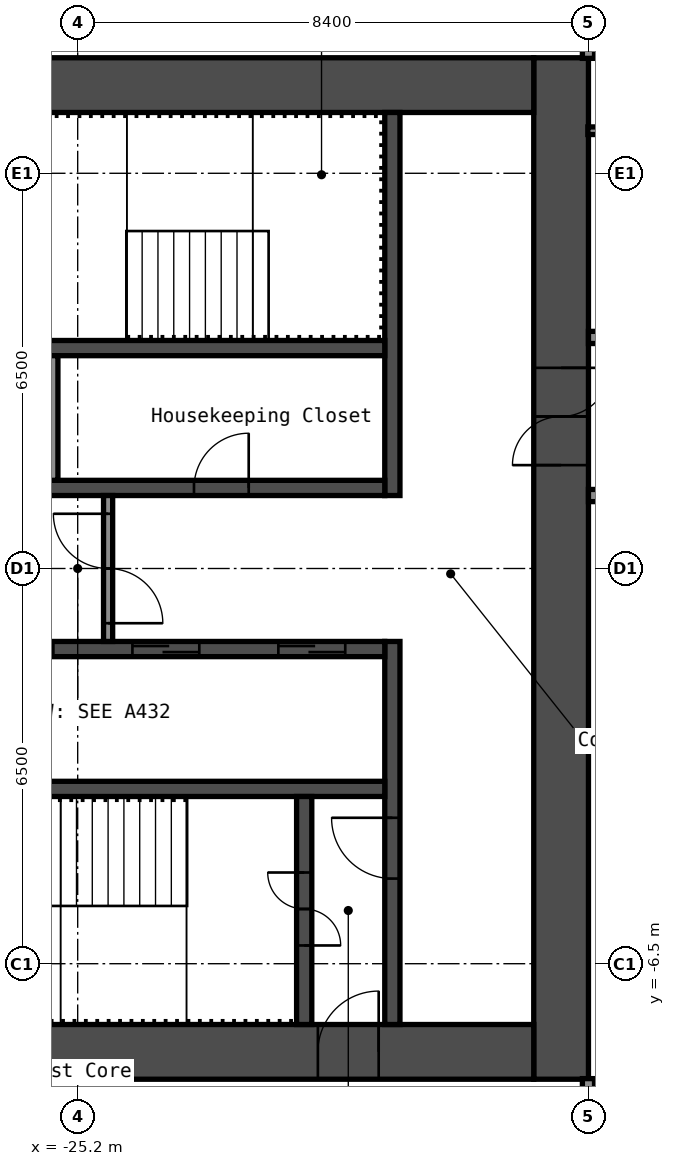
"""IFC4 building model, lengths in metres.
Left out: names, types, materials, properties, quantities, classifications, styles, units other than length and angle.
Written with IfcOpenShell. Run it as: python <this file> out.ifc"""

import sys

from ifc_helpers import new_model, si_unit, direction, frame, frame_2d, origin, place, context, subcontext, project, spatial, rectangle, extrude, element, fill, save


model = new_model("IFC4")
c1 = context("Model", 3, precision=1e-05, world=origin(), true_north=direction((0.0, 1.0)))
c2 = subcontext(c1, "Body", "Model", "MODEL_VIEW")
j1 = project(units=[si_unit("LENGTHUNIT", "METRE"), si_unit("PLANEANGLEUNIT", "RADIAN")], contexts=[c1])
p1 = place(None, origin())
s1 = spatial("IfcSite", under=j1, at=p1, CompositionType="ELEMENT")
p2 = place(p1, origin())
s2 = spatial("IfcBuilding", under=s1, at=p2, CompositionType="ELEMENT")
p3 = place(p2, frame((0.0, 0.0, 225.0)))
s3 = spatial("IfcBuildingStorey", under=s2, at=p3, CompositionType="ELEMENT", Elevation=225.0)
p4 = place(p3, frame((-17.25, -8.4, 0.0), z_axis=(0.0, 0.0, 1.0), x_axis=(0.0, 1.0, 0.0)))
e1 = element("IfcWall", 1, at=p4, inside=s3, PredefinedType="SHEAR", context=c2, shape_type="SweptSolid", body=[
    extrude(rectangle(XDim=16.8, YDim=0.9, at=frame_2d((8.4, 0.0))), origin(), (0.0, 0.0, 1.0), 2.9),
])
p5 = place(p4, frame((10.1, 0.0, 0.0)))
e2 = element("IfcOpeningElement", 2, at=p5, cuts=e1, PredefinedType="OPENING", context=c2, shape_type="SweptSolid", body=[
    extrude(rectangle(XDim=1.6, YDim=2.1, at=frame_2d((0.8, 1.05))), frame((0.0, 0.46, 0.0), z_axis=(0.0, -1.0, 0.0), x_axis=(1.0, 0.0, 0.0)), (0.0, 0.0, 1.0), 0.92),
])
p6 = place(p3, frame((-32.7, 7.95, 0.0), z_axis=(0.0, 0.0, 1.0), x_axis=(1.0, 0.0, 0.0)))
e3 = element("IfcWall", 3, at=p6, inside=s3, PredefinedType="SHEAR", context=c2, shape_type="SweptSolid", body=[
    extrude(rectangle(XDim=15.0, YDim=0.9, at=frame_2d((7.5, 0.0))), origin(), (0.0, 0.0, 1.0), 2.9),
])
p7 = place(p6, frame((3.4, 0.0, 0.0)))
e4 = element("IfcOpeningElement", 4, at=p7, cuts=e3, PredefinedType="OPENING", context=c2, shape_type="SweptSolid", body=[
    extrude(rectangle(XDim=1.2, YDim=2.1, at=frame_2d((0.6, 1.05))), frame((0.0, 0.46, 0.0), z_axis=(0.0, -1.0, 0.0), x_axis=(1.0, 0.0, 0.0)), (0.0, 0.0, 1.0), 0.92),
])
p8 = place(p6, frame((0.75, 0.0, 0.0)))
e5 = element("IfcOpeningElement", 5, at=p8, cuts=e3, PredefinedType="OPENING", context=c2, shape_type="SweptSolid", body=[
    extrude(rectangle(XDim=0.9, YDim=2.1, at=frame_2d((0.45, 1.05))), frame((0.0, 0.46, 0.0), z_axis=(0.0, -1.0, 0.0), x_axis=(1.0, 0.0, 0.0)), (0.0, 0.0, 1.0), 0.92),
])
p9 = place(p3, frame((-32.7, -7.95, 0.0), z_axis=(0.0, 0.0, 1.0), x_axis=(1.0, 0.0, 0.0)))
e6 = element("IfcWall", 6, at=p9, inside=s3, PredefinedType="SHEAR", context=c2, shape_type="SweptSolid", body=[
    extrude(rectangle(XDim=15.0, YDim=0.9, at=frame_2d((7.5, 0.0))), origin(), (0.0, 0.0, 1.0), 2.9),
])
p10 = place(p9, frame((11.45, 0.0, 0.0)))
e7 = element("IfcOpeningElement", 7, at=p10, cuts=e6, PredefinedType="OPENING", context=c2, shape_type="SweptSolid", body=[
    extrude(rectangle(XDim=1.0, YDim=2.1, at=frame_2d((0.5, 1.05))), frame((0.0, 0.46, 0.0), z_axis=(0.0, -1.0, 0.0), x_axis=(1.0, 0.0, 0.0)), (0.0, 0.0, 1.0), 0.92),
])
p11 = place(p3, frame((-20.025, 1.2, 0.0), z_axis=(0.0, 0.0, 1.0), x_axis=(0.0, 1.0, 0.0)))
e8 = element("IfcWall", 8, at=p11, inside=s3, PredefinedType="SHEAR", context=c2, shape_type="SweptSolid", body=[
    extrude(rectangle(XDim=6.3, YDim=0.25, at=frame_2d((3.15, 0.0))), origin(), (0.0, 0.0, 1.0), 2.9),
])
p12 = place(p3, frame((-20.025, -7.5, 0.0), z_axis=(0.0, 0.0, 1.0), x_axis=(0.0, 1.0, 0.0)))
e9 = element("IfcWall", 9, at=p12, inside=s3, PredefinedType="SHEAR", context=c2, shape_type="SweptSolid", body=[
    extrude(rectangle(XDim=6.3, YDim=0.25, at=frame_2d((3.15, 0.0))), origin(), (0.0, 0.0, 1.0), 2.9),
])
p13 = place(p12, frame((2.4, 0.0, 0.0)))
e10 = element("IfcOpeningElement", 10, at=p13, cuts=e9, PredefinedType="OPENING", context=c2, shape_type="SweptSolid", body=[
    extrude(rectangle(XDim=1.0, YDim=2.1, at=frame_2d((0.5, 1.05))), frame((0.0, 0.135, 0.0), z_axis=(0.0, -1.0, 0.0), x_axis=(1.0, 0.0, 0.0)), (0.0, 0.0, 1.0), 0.27),
])
p14 = place(p3, frame((-27.65, 1.325, 0.0), z_axis=(0.0, 0.0, 1.0), x_axis=(1.0, 0.0, 0.0)))
e11 = element("IfcWall", 11, at=p14, inside=s3, PredefinedType="SHEAR", context=c2, shape_type="SweptSolid", body=[
    extrude(rectangle(XDim=7.5, YDim=0.25, at=frame_2d((3.75, 0.0))), origin(), (0.0, 0.0, 1.0), 2.9),
])
p15 = place(p14, frame((4.363, 0.0, 0.0)))
e12 = element("IfcOpeningElement", 12, at=p15, cuts=e11, PredefinedType="OPENING", context=c2, shape_type="SweptSolid", body=[
    extrude(rectangle(XDim=0.9, YDim=2.1, at=frame_2d((0.45, 1.05))), frame((0.0, 0.135, 0.0), z_axis=(0.0, -1.0, 0.0), x_axis=(1.0, 0.0, 0.0)), (0.0, 0.0, 1.0), 0.27),
])
p16 = place(p14, frame((0.663, 0.0, 0.0)))
e13 = element("IfcOpeningElement", 13, at=p16, cuts=e11, PredefinedType="OPENING", context=c2, shape_type="SweptSolid", body=[
    extrude(rectangle(XDim=0.9, YDim=2.1, at=frame_2d((0.45, 1.05))), frame((0.0, 0.135, 0.0), z_axis=(0.0, -1.0, 0.0), x_axis=(1.0, 0.0, 0.0)), (0.0, 0.0, 1.0), 0.27),
])
p17 = place(p3, frame((-27.65, 3.625, 0.0), z_axis=(0.0, 0.0, 1.0), x_axis=(1.0, 0.0, 0.0)))
e14 = element("IfcWall", 14, at=p17, inside=s3, PredefinedType="SHEAR", context=c2, shape_type="SweptSolid", body=[
    extrude(rectangle(XDim=7.5, YDim=0.25, at=frame_2d((3.75, 0.0))), origin(), (0.0, 0.0, 1.0), 2.9),
])
p18 = place(p3, frame((-27.65, -1.325, 0.0), z_axis=(0.0, 0.0, 1.0), x_axis=(1.0, 0.0, 0.0)))
e15 = element("IfcWall", 15, at=p18, inside=s3, PredefinedType="SHEAR", context=c2, shape_type="SweptSolid", body=[
    extrude(rectangle(XDim=7.5, YDim=0.25, at=frame_2d((3.75, 0.0))), origin(), (0.0, 0.0, 1.0), 2.9),
])
p19 = place(p18, frame((5.75, 0.0, 0.0)))
e16 = element("IfcOpeningElement", 16, at=p19, cuts=e15, PredefinedType="OPENING", context=c2, shape_type="SweptSolid", body=[
    extrude(rectangle(XDim=1.1, YDim=2.1, at=frame_2d((0.55, 1.05))), frame((0.0, 0.135, 0.0), z_axis=(0.0, -1.0, 0.0), x_axis=(1.0, 0.0, 0.0)), (0.0, 0.0, 1.0), 0.27),
])
p20 = place(p18, frame((3.35, 0.0, 0.0)))
e17 = element("IfcOpeningElement", 17, at=p20, cuts=e15, PredefinedType="OPENING", context=c2, shape_type="SweptSolid", body=[
    extrude(rectangle(XDim=1.1, YDim=2.1, at=frame_2d((0.55, 1.05))), frame((0.0, 0.135, 0.0), z_axis=(0.0, -1.0, 0.0), x_axis=(1.0, 0.0, 0.0)), (0.0, 0.0, 1.0), 0.27),
])
p21 = place(p18, frame((0.95, 0.0, 0.0)))
e18 = element("IfcOpeningElement", 18, at=p21, cuts=e15, PredefinedType="OPENING", context=c2, shape_type="SweptSolid", body=[
    extrude(rectangle(XDim=1.1, YDim=2.1, at=frame_2d((0.55, 1.05))), frame((0.0, 0.135, 0.0), z_axis=(0.0, -1.0, 0.0), x_axis=(1.0, 0.0, 0.0)), (0.0, 0.0, 1.0), 0.27),
])
p22 = place(p3, frame((-27.65, -3.625, 0.0), z_axis=(0.0, 0.0, 1.0), x_axis=(1.0, 0.0, 0.0)))
e19 = element("IfcWall", 19, at=p22, inside=s3, PredefinedType="SHEAR", context=c2, shape_type="SweptSolid", body=[
    extrude(rectangle(XDim=7.5, YDim=0.25, at=frame_2d((3.75, 0.0))), origin(), (0.0, 0.0, 1.0), 2.9),
])
p23 = place(p3, frame((-21.475, -7.5, 0.0), z_axis=(0.0, 0.0, 1.0), x_axis=(0.0, 1.0, 0.0)))
e20 = element("IfcWall", 20, at=p23, inside=s3, PredefinedType="SHEAR", context=c2, shape_type="SweptSolid", body=[
    extrude(rectangle(XDim=3.75, YDim=0.25, at=frame_2d((1.875, 0.0))), origin(), (0.0, 0.0, 1.0), 2.9),
])
p24 = place(p23, frame((1.3, 0.0, 0.0)))
e21 = element("IfcOpeningElement", 21, at=p24, cuts=e20, PredefinedType="OPENING", context=c2, shape_type="SweptSolid", body=[
    extrude(rectangle(XDim=1.2, YDim=2.1, at=frame_2d((0.6, 1.05))), frame((0.0, 0.135, 0.0), z_axis=(0.0, -1.0, 0.0), x_axis=(1.0, 0.0, 0.0)), (0.0, 0.0, 1.0), 0.27),
])
p25 = place(p3, frame((-24.7, -1.2, 0.0), z_axis=(0.0, 0.0, 1.0), x_axis=(0.0, 1.0, 0.0)))
e22 = element("IfcWall", 22, at=p25, inside=s3, PredefinedType="PARTITIONING", context=c2, shape_type="SweptSolid", body=[
    extrude(rectangle(XDim=2.4, YDim=0.15, at=frame_2d((1.2, 0.0))), origin(), (0.0, 0.0, 1.0), 2.9),
])
p26 = place(p25, frame((0.3, 0.0, 0.0)))
e23 = element("IfcOpeningElement", 23, at=p26, cuts=e22, PredefinedType="OPENING", context=c2, shape_type="SweptSolid", body=[
    extrude(rectangle(XDim=1.8, YDim=2.1, at=frame_2d((0.9, 1.05))), frame((0.0, 0.085, 0.0), z_axis=(0.0, -1.0, 0.0), x_axis=(1.0, 0.0, 0.0)), (0.0, 0.0, 1.0), 0.17),
])
p27 = place(p3, frame((-25.6, 1.45, 0.0), z_axis=(0.0, 0.0, 1.0), x_axis=(0.0, 1.0, 0.0)))
e24 = element("IfcWall", 24, at=p27, inside=s3, PredefinedType="PARTITIONING", context=c2, shape_type="SweptSolid", body=[
    extrude(rectangle(XDim=2.05, YDim=0.15, at=frame_2d((1.025, 0.0))), origin(), (0.0, 0.0, 1.0), 2.9),
])
p28 = place(p3, frame((-16.8, 1.2, 0.0), z_axis=(0.0, 0.0, 1.0), x_axis=(1.0, 0.0, 0.0)))
e25 = element("IfcWall", 25, at=p28, inside=s3, PredefinedType="PARTITIONING", context=c2, shape_type="SweptSolid", body=[
    extrude(rectangle(XDim=33.6, YDim=0.2, at=frame_2d((16.8, 0.0))), origin(), (0.0, 0.0, 1.0), 2.9),
])
p29 = place(p28, frame((2.0, 0.0, 0.0)))
e26 = element("IfcOpeningElement", 26, at=p29, cuts=e25, PredefinedType="OPENING", context=c2, shape_type="SweptSolid", body=[
    extrude(rectangle(XDim=1.0, YDim=2.1, at=frame_2d((0.5, 1.05))), frame((0.0, 0.11, 0.0), z_axis=(0.0, -1.0, 0.0), x_axis=(1.0, 0.0, 0.0)), (0.0, 0.0, 1.0), 0.22),
])
p30 = place(p28, frame((11.25, 0.0, 0.0)))
e27 = element("IfcOpeningElement", 27, at=p30, cuts=e25, PredefinedType="OPENING", context=c2, shape_type="SweptSolid", body=[
    extrude(rectangle(XDim=1.0, YDim=2.1, at=frame_2d((0.5, 1.05))), frame((0.0, 0.11, 0.0), z_axis=(0.0, -1.0, 0.0), x_axis=(1.0, 0.0, 0.0)), (0.0, 0.0, 1.0), 0.22),
])
p31 = place(p28, frame((12.95, 0.0, 0.0)))
e28 = element("IfcOpeningElement", 28, at=p31, cuts=e25, PredefinedType="OPENING", context=c2, shape_type="SweptSolid", body=[
    extrude(rectangle(XDim=1.0, YDim=2.1, at=frame_2d((0.5, 1.05))), frame((0.0, 0.11, 0.0), z_axis=(0.0, -1.0, 0.0), x_axis=(1.0, 0.0, 0.0)), (0.0, 0.0, 1.0), 0.22),
])
p32 = place(p28, frame((18.785, 0.0, 0.0)))
e29 = element("IfcOpeningElement", 29, at=p32, cuts=e25, PredefinedType="OPENING", context=c2, shape_type="SweptSolid", body=[
    extrude(rectangle(XDim=0.9, YDim=2.1, at=frame_2d((0.45, 1.05))), frame((0.0, 0.11, 0.0), z_axis=(0.0, -1.0, 0.0), x_axis=(1.0, 0.0, 0.0)), (0.0, 0.0, 1.0), 0.22),
])
p33 = place(p28, frame((22.985, 0.0, 0.0)))
e30 = element("IfcOpeningElement", 30, at=p33, cuts=e25, PredefinedType="OPENING", context=c2, shape_type="SweptSolid", body=[
    extrude(rectangle(XDim=0.9, YDim=2.1, at=frame_2d((0.45, 1.05))), frame((0.0, 0.11, 0.0), z_axis=(0.0, -1.0, 0.0), x_axis=(1.0, 0.0, 0.0)), (0.0, 0.0, 1.0), 0.22),
])
p34 = place(p28, frame((28.05, 0.0, 0.0)))
e31 = element("IfcOpeningElement", 31, at=p34, cuts=e25, PredefinedType="OPENING", context=c2, shape_type="SweptSolid", body=[
    extrude(rectangle(XDim=1.0, YDim=2.1, at=frame_2d((0.5, 1.05))), frame((0.0, 0.11, 0.0), z_axis=(0.0, -1.0, 0.0), x_axis=(1.0, 0.0, 0.0)), (0.0, 0.0, 1.0), 0.22),
])
p35 = place(p28, frame((29.75, 0.0, 0.0)))
e32 = element("IfcOpeningElement", 32, at=p35, cuts=e25, PredefinedType="OPENING", context=c2, shape_type="SweptSolid", body=[
    extrude(rectangle(XDim=1.0, YDim=2.1, at=frame_2d((0.5, 1.05))), frame((0.0, 0.11, 0.0), z_axis=(0.0, -1.0, 0.0), x_axis=(1.0, 0.0, 0.0)), (0.0, 0.0, 1.0), 0.22),
])
p36 = place(p3, frame((-16.8, 3.8, 0.0), z_axis=(0.0, 0.0, 1.0), x_axis=(1.0, 0.0, 0.0)))
e33 = element("IfcWall", 33, at=p36, inside=s3, PredefinedType="PARTITIONING", context=c2, shape_type="SweptSolid", body=[
    extrude(rectangle(XDim=33.6, YDim=0.2, at=frame_2d((16.8, 0.0))), origin(), (0.0, 0.0, 1.0), 2.9),
])
p37 = place(p36, frame((5.4, 0.0, 0.0)))
e34 = element("IfcOpeningElement", 34, at=p37, cuts=e33, PredefinedType="OPENING", context=c2, shape_type="SweptSolid", body=[
    extrude(rectangle(XDim=1.0, YDim=2.1, at=frame_2d((0.5, 1.05))), frame((0.0, 0.11, 0.0), z_axis=(0.0, -1.0, 0.0), x_axis=(1.0, 0.0, 0.0)), (0.0, 0.0, 1.0), 0.22),
])
p38 = place(p36, frame((11.25, 0.0, 0.0)))
e35 = element("IfcOpeningElement", 35, at=p38, cuts=e33, PredefinedType="OPENING", context=c2, shape_type="SweptSolid", body=[
    extrude(rectangle(XDim=1.0, YDim=2.1, at=frame_2d((0.5, 1.05))), frame((0.0, 0.11, 0.0), z_axis=(0.0, -1.0, 0.0), x_axis=(1.0, 0.0, 0.0)), (0.0, 0.0, 1.0), 0.22),
])
p39 = place(p36, frame((12.95, 0.0, 0.0)))
e36 = element("IfcOpeningElement", 36, at=p39, cuts=e33, PredefinedType="OPENING", context=c2, shape_type="SweptSolid", body=[
    extrude(rectangle(XDim=1.0, YDim=2.1, at=frame_2d((0.5, 1.05))), frame((0.0, 0.11, 0.0), z_axis=(0.0, -1.0, 0.0), x_axis=(1.0, 0.0, 0.0)), (0.0, 0.0, 1.0), 0.22),
])
p40 = place(p36, frame((18.2, 0.0, 0.0)))
e37 = element("IfcOpeningElement", 37, at=p40, cuts=e33, PredefinedType="OPENING", context=c2, shape_type="SweptSolid", body=[
    extrude(rectangle(XDim=0.9, YDim=2.1, at=frame_2d((0.45, 1.05))), frame((0.0, 0.11, 0.0), z_axis=(0.0, -1.0, 0.0), x_axis=(1.0, 0.0, 0.0)), (0.0, 0.0, 1.0), 0.22),
])
p41 = place(p36, frame((22.4, 0.0, 0.0)))
e38 = element("IfcOpeningElement", 38, at=p41, cuts=e33, PredefinedType="OPENING", context=c2, shape_type="SweptSolid", body=[
    extrude(rectangle(XDim=0.9, YDim=2.1, at=frame_2d((0.45, 1.05))), frame((0.0, 0.11, 0.0), z_axis=(0.0, -1.0, 0.0), x_axis=(1.0, 0.0, 0.0)), (0.0, 0.0, 1.0), 0.22),
])
p42 = place(p36, frame((28.05, 0.0, 0.0)))
e39 = element("IfcOpeningElement", 39, at=p42, cuts=e33, PredefinedType="OPENING", context=c2, shape_type="SweptSolid", body=[
    extrude(rectangle(XDim=1.0, YDim=2.1, at=frame_2d((0.5, 1.05))), frame((0.0, 0.11, 0.0), z_axis=(0.0, -1.0, 0.0), x_axis=(1.0, 0.0, 0.0)), (0.0, 0.0, 1.0), 0.22),
])
p43 = place(p36, frame((29.75, 0.0, 0.0)))
e40 = element("IfcOpeningElement", 40, at=p43, cuts=e33, PredefinedType="OPENING", context=c2, shape_type="SweptSolid", body=[
    extrude(rectangle(XDim=1.0, YDim=2.1, at=frame_2d((0.5, 1.05))), frame((0.0, 0.11, 0.0), z_axis=(0.0, -1.0, 0.0), x_axis=(1.0, 0.0, 0.0)), (0.0, 0.0, 1.0), 0.22),
])
p44 = place(p3, frame((-16.81, 7.2, 0.0), z_axis=(0.0, 0.0, 1.0), x_axis=(1.0, 0.0, 0.0)))
e41 = element("IfcWall", 41, at=p44, inside=s3, PredefinedType="PARTITIONING", context=c2, shape_type="SweptSolid", body=[
    extrude(rectangle(XDim=3.348, YDim=0.125, at=frame_2d((1.674, 0.0))), origin(), (0.0, 0.0, 1.0), 2.9),
])
p45 = place(p44, frame((1.31, 0.0, 0.0)))
e42 = element("IfcOpeningElement", 42, at=p45, cuts=e41, PredefinedType="OPENING", context=c2, shape_type="SweptSolid", body=[
    extrude(rectangle(XDim=0.8, YDim=2.1, at=frame_2d((0.4, 1.05))), frame((0.0, 0.073, 0.0), z_axis=(0.0, -1.0, 0.0), x_axis=(1.0, 0.0, 0.0)), (0.0, 0.0, 1.0), 0.145),
])
p46 = place(p3, frame((-16.8, -15.55, 0.0), z_axis=(0.0, 0.0, 1.0), x_axis=(0.0, 1.0, 0.0)))
e43 = element("IfcWall", 43, at=p46, inside=s3, PredefinedType="PARTITIONING", context=c2, shape_type="SweptSolid", body=[
    extrude(rectangle(XDim=7.16, YDim=0.2, at=frame_2d((3.58, 0.0))), origin(), (0.0, 0.0, 1.0), 2.9),
])
p47 = place(p3, frame((-16.8, 8.39, 0.0), z_axis=(0.0, 0.0, 1.0), x_axis=(0.0, 1.0, 0.0)))
e44 = element("IfcWall", 44, at=p47, inside=s3, PredefinedType="PARTITIONING", context=c2, shape_type="SweptSolid", body=[
    extrude(rectangle(XDim=12.16, YDim=0.2, at=frame_2d((6.08, 0.0))), origin(), (0.0, 0.0, 1.0), 2.9),
])
p48 = place(p5, origin())
e45 = element("IfcDoor", 45, at=p48, inside=s3, OperationType="DOUBLE_DOOR_SINGLE_SWING", PredefinedType="DOOR", context=c2, shape_type="SweptSolid", body=[
    extrude(rectangle(XDim=1.6, YDim=2.1, at=frame_2d((0.8, 1.05))), frame((0.0, 0.025, 0.0), z_axis=(0.0, -1.0, 0.0), x_axis=(1.0, 0.0, 0.0)), (0.0, 0.0, 1.0), 0.05),
])
fill(e2, e45)
p49 = place(p10, origin())
e46 = element("IfcDoor", 46, at=p49, inside=s3, OperationType="SINGLE_SWING_LEFT", PredefinedType="DOOR", context=c2, shape_type="SweptSolid", body=[
    extrude(rectangle(XDim=1.0, YDim=2.1, at=frame_2d((0.5, 1.05))), frame((0.0, 0.025, 0.0), z_axis=(0.0, -1.0, 0.0), x_axis=(1.0, 0.0, 0.0)), (0.0, 0.0, 1.0), 0.05),
])
fill(e7, e46)
p50 = place(p24, origin())
e47 = element("IfcDoor", 47, at=p50, inside=s3, OperationType="DOUBLE_DOOR_SINGLE_SWING", PredefinedType="DOOR", context=c2, shape_type="SweptSolid", body=[
    extrude(rectangle(XDim=1.2, YDim=2.1, at=frame_2d((0.6, 1.05))), frame((0.0, 0.025, 0.0), z_axis=(0.0, -1.0, 0.0), x_axis=(1.0, 0.0, 0.0)), (0.0, 0.0, 1.0), 0.05),
])
fill(e21, e47)
p51 = place(p13, origin())
e48 = element("IfcDoor", 48, at=p51, inside=s3, OperationType="SINGLE_SWING_LEFT", PredefinedType="DOOR", context=c2, shape_type="SweptSolid", body=[
    extrude(rectangle(XDim=1.0, YDim=2.1, at=frame_2d((0.5, 1.05))), frame((0.0, 0.025, 0.0), z_axis=(0.0, -1.0, 0.0), x_axis=(1.0, 0.0, 0.0)), (0.0, 0.0, 1.0), 0.05),
])
fill(e10, e48)
p52 = place(p26, origin())
e49 = element("IfcDoor", 49, at=p52, inside=s3, OperationType="DOUBLE_DOOR_SINGLE_SWING", PredefinedType="DOOR", context=c2, shape_type="SweptSolid", body=[
    extrude(rectangle(XDim=1.8, YDim=2.1, at=frame_2d((0.9, 1.05))), frame((0.0, 0.025, 0.0), z_axis=(0.0, -1.0, 0.0), x_axis=(1.0, 0.0, 0.0)), (0.0, 0.0, 1.0), 0.05),
])
fill(e23, e49)
p53 = place(p15, origin())
e50 = element("IfcDoor", 50, at=p53, inside=s3, OperationType="SINGLE_SWING_LEFT", PredefinedType="DOOR", context=c2, shape_type="SweptSolid", body=[
    extrude(rectangle(XDim=0.9, YDim=2.1, at=frame_2d((0.45, 1.05))), frame((0.0, 0.025, 0.0), z_axis=(0.0, -1.0, 0.0), x_axis=(1.0, 0.0, 0.0)), (0.0, 0.0, 1.0), 0.05),
])
fill(e12, e50)
p54 = place(p19, origin())
e51 = element("IfcDoor", 51, at=p54, inside=s3, OperationType="DOUBLE_DOOR_SLIDING", PredefinedType="DOOR", context=c2, shape_type="SweptSolid", body=[
    extrude(rectangle(XDim=1.1, YDim=2.1, at=frame_2d((0.55, 1.05))), frame((0.0, 0.025, 0.0), z_axis=(0.0, -1.0, 0.0), x_axis=(1.0, 0.0, 0.0)), (0.0, 0.0, 1.0), 0.05),
])
fill(e16, e51)
p55 = place(p20, origin())
e52 = element("IfcDoor", 52, at=p55, inside=s3, OperationType="DOUBLE_DOOR_SLIDING", PredefinedType="DOOR", context=c2, shape_type="SweptSolid", body=[
    extrude(rectangle(XDim=1.1, YDim=2.1, at=frame_2d((0.55, 1.05))), frame((0.0, 0.025, 0.0), z_axis=(0.0, -1.0, 0.0), x_axis=(1.0, 0.0, 0.0)), (0.0, 0.0, 1.0), 0.05),
])
fill(e17, e52)
p56 = place(p21, origin())
e53 = element("IfcDoor", 53, at=p56, inside=s3, OperationType="DOUBLE_DOOR_SLIDING", PredefinedType="DOOR", context=c2, shape_type="SweptSolid", body=[
    extrude(rectangle(XDim=1.1, YDim=2.1, at=frame_2d((0.55, 1.05))), frame((0.0, 0.025, 0.0), z_axis=(0.0, -1.0, 0.0), x_axis=(1.0, 0.0, 0.0)), (0.0, 0.0, 1.0), 0.05),
])
fill(e18, e53)
save(model, sys.argv[1])
